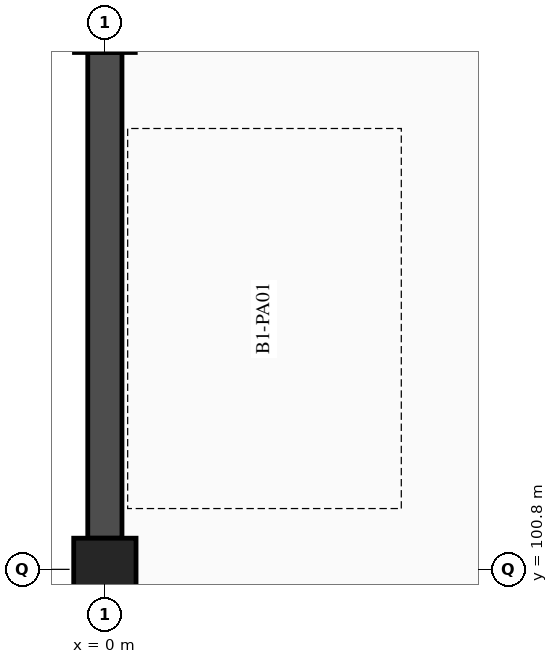
"""IFC4 building model, lengths in metres.
Left out: names, types, materials, properties, quantities, classifications, styles, units other than length and angle.
Written with IfcOpenShell. Run it as: python <this file> out.ifc"""

import sys

from ifc_helpers import new_model, si_unit, direction, frame, frame_2d, origin, origin_2d, place, context, subcontext, project, spatial, rectangle, extrude, element, save


model = new_model("IFC4")
c1 = context("Model", 3, precision=1e-05, world=origin(), true_north=direction((0.0, 1.0)))
c2 = subcontext(c1, "Body", "Model", "MODEL_VIEW")
j1 = project(units=[si_unit("LENGTHUNIT", "METRE"), si_unit("PLANEANGLEUNIT", "RADIAN")], contexts=[c1])
p1 = place(None, origin())
s1 = spatial("IfcSite", under=j1, at=p1, CompositionType="ELEMENT")
p2 = place(p1, origin())
s2 = spatial("IfcBuilding", under=s1, at=p2, CompositionType="ELEMENT")
p3 = place(p2, frame((0.0, 0.0, -4.5)))
s3 = spatial("IfcBuildingStorey", under=s2, at=p3, CompositionType="ELEMENT", Elevation=-4.5)
p4 = place(p3, frame((0.0, 100.8, -0.45), z_axis=(0.0, 0.0, 1.0), x_axis=(1.0, 0.0, 0.0)))
e1 = element("IfcColumn", 1, at=p4, inside=s3, PredefinedType="COLUMN", context=c2, shape_type="SweptSolid", body=[
    extrude(rectangle(XDim=0.82, YDim=0.82, at=origin_2d()), origin(), (0.0, 0.0, 1.0), 4.95),
])
p5 = place(p3, frame((0.0, 108.0, -0.45), z_axis=(0.0, 0.0, 1.0), x_axis=(1.0, 0.0, 0.0)))
e2 = element("IfcColumn", 2, at=p5, inside=s3, PredefinedType="COLUMN", context=c2, shape_type="SweptSolid", body=[
    extrude(rectangle(XDim=0.8, YDim=0.8, at=origin_2d()), origin(), (0.0, 0.0, 1.0), 4.95),
])
p6 = place(p3, frame((0.0, 101.21, 0.0), z_axis=(0.0, 0.0, 1.0), x_axis=(0.0, 1.0, 0.0)))
e3 = element("IfcWall", 3, at=p6, inside=s3, PredefinedType="SOLIDWALL", context=c2, shape_type="SweptSolid", body=[
    extrude(rectangle(XDim=6.39, YDim=0.45, at=frame_2d((3.195, 0.0))), origin(), (0.0, 0.0, 1.0), 4.17),
])
save(model, sys.argv[1])
